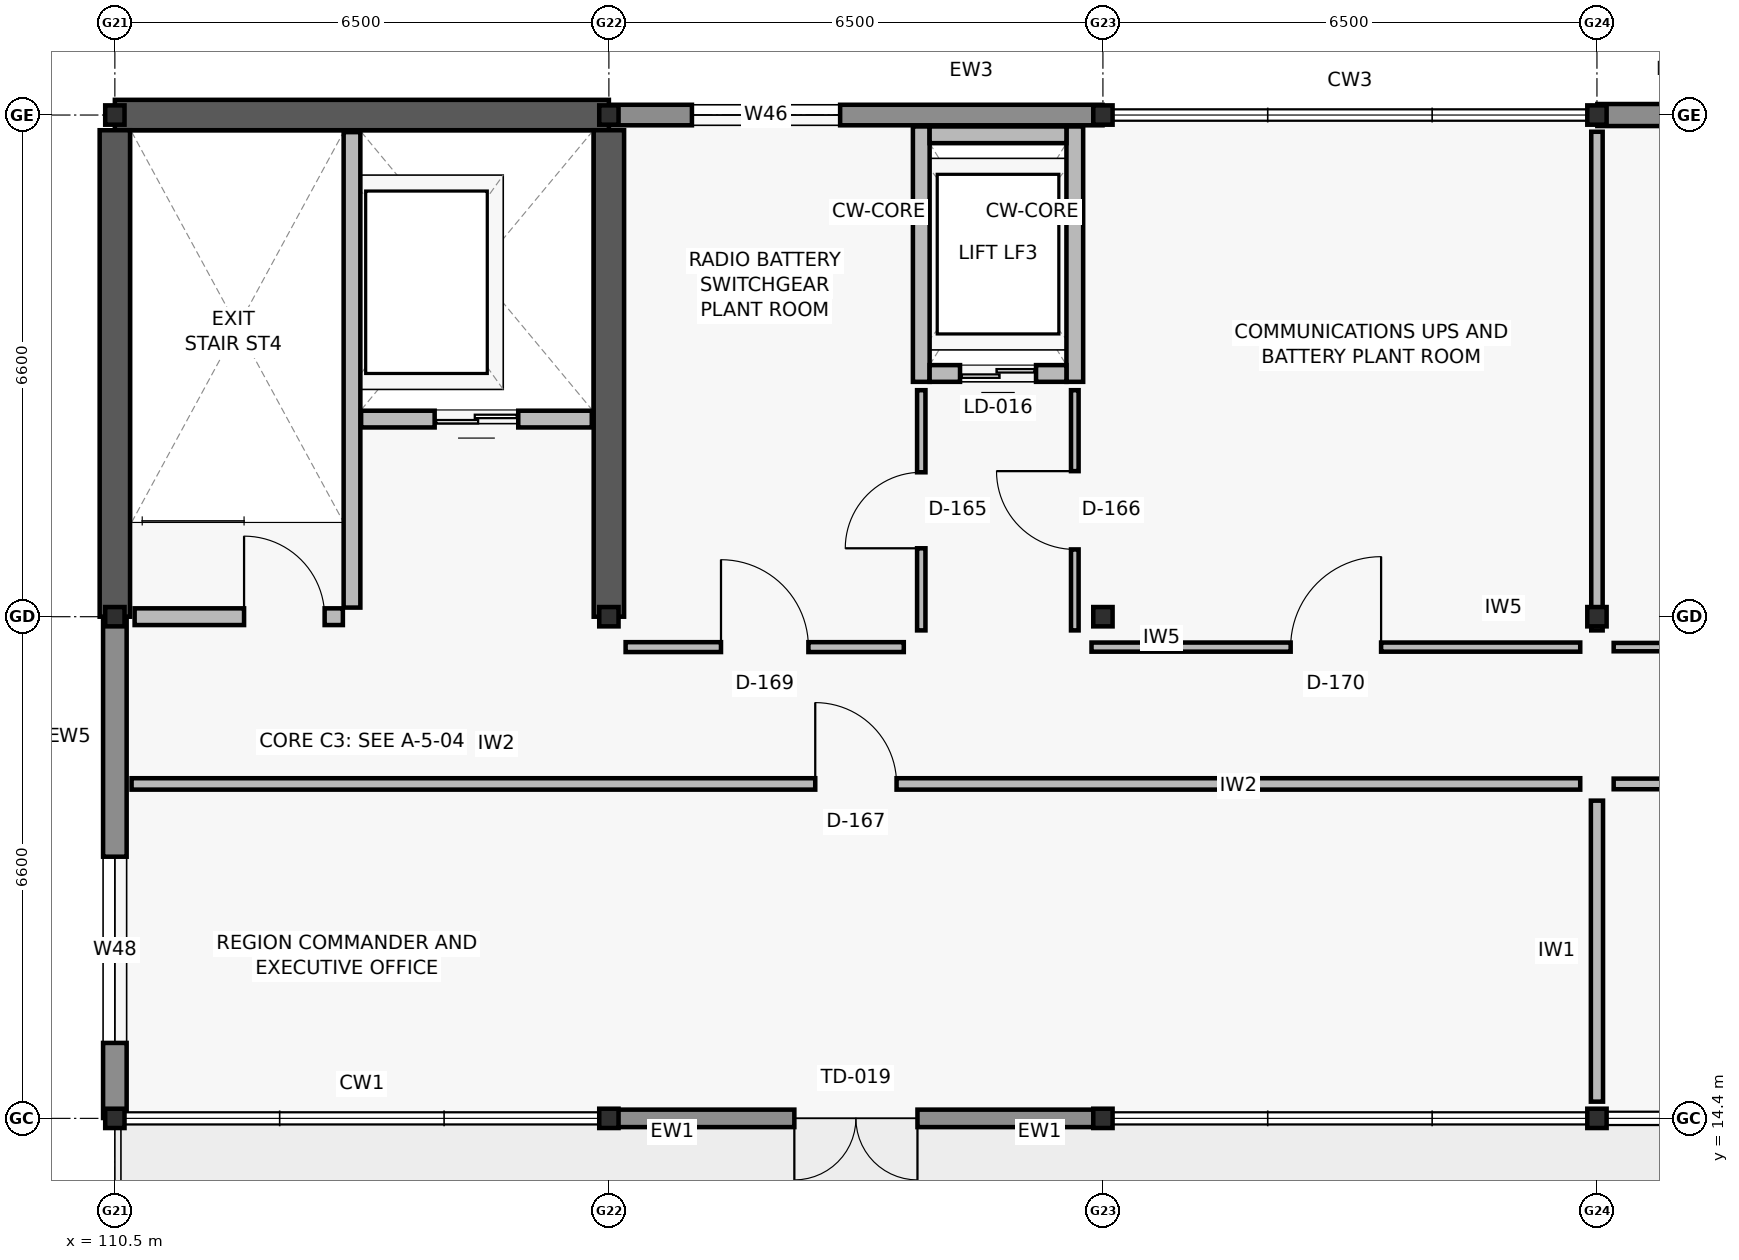
"""IFC4 building model, lengths in metres.
Left out: names, types, materials, properties, quantities, classifications, styles, units other than length and angle.
Written with IfcOpenShell. Run it as: python <this file> out.ifc"""

import sys

from ifc_helpers import new_model, si_unit, direction, frame, frame_2d, origin, origin_2d, place, context, subcontext, project, spatial, rectangle, i_section, extrude, element, fill, save


model = new_model("IFC4")
c1 = context("Model", 3, precision=1e-05, world=origin(), true_north=direction((0.0, 1.0)))
c2 = subcontext(c1, "Body", "Model", "MODEL_VIEW")
j1 = project(units=[si_unit("LENGTHUNIT", "METRE"), si_unit("PLANEANGLEUNIT", "RADIAN")], contexts=[c1])
p1 = place(None, origin())
s1 = spatial("IfcSite", under=j1, at=p1, CompositionType="ELEMENT")
p2 = place(p1, origin())
s2 = spatial("IfcBuilding", under=s1, at=p2, CompositionType="ELEMENT")
p3 = place(p2, frame((0.0, 0.0, 21.3)))
s3 = spatial("IfcBuildingStorey", under=s2, at=p3, CompositionType="ELEMENT", Elevation=21.3)
for number, where, z_axis, x_axis in (
    (1, (110.5, 14.4, 0.0), (0.0, 0.0, 1.0), (1.0, 0.0, 0.0)),
    (2, (110.5, 21.0, 0.0), (0.0, 0.0, 1.0), (1.0, 0.0, 0.0)),
    (3, (110.5, 27.6, 0.0), (0.0, 0.0, 1.0), (1.0, 0.0, 0.0)),
    (4, (117.0, 14.4, 0.0), (0.0, 0.0, 1.0), (1.0, 0.0, 0.0)),
    (5, (117.0, 21.0, 0.0), (0.0, 0.0, 1.0), (1.0, 0.0, 0.0)),
    (6, (117.0, 27.6, 0.0), (0.0, 0.0, 1.0), (1.0, 0.0, 0.0)),
    (7, (123.5, 14.4, 0.0), (0.0, 0.0, 1.0), (1.0, 0.0, 0.0)),
    (8, (123.5, 21.0, 0.0), (0.0, 0.0, 1.0), (1.0, 0.0, 0.0)),
    (9, (123.5, 27.6, 0.0), (0.0, 0.0, 1.0), (1.0, 0.0, 0.0)),
    (10, (130.0, 14.4, 0.0), (0.0, 0.0, 1.0), (1.0, 0.0, 0.0)),
    (11, (130.0, 21.0, 0.0), (0.0, 0.0, 1.0), (1.0, 0.0, 0.0)),
    (12, (130.0, 27.6, 0.0), (0.0, 0.0, 1.0), (1.0, 0.0, 0.0)),
):
    element("IfcColumn", number, at=place(p3, frame(where, z_axis=z_axis, x_axis=x_axis)), inside=s3, PredefinedType="COLUMN", context=c2, shape_type="SweptSolid", body=[
        extrude(i_section(OverallWidth=0.254, OverallDepth=0.254, WebThickness=0.009, FlangeThickness=0.014, FilletRadius=0.013, at=origin_2d()), origin(), (0.0, 0.0, 1.0), 3.9),
    ])
p4 = place(p3, frame((110.5, 27.6, 0.0), z_axis=(0.0, 0.0, 1.0), x_axis=(1.0, 0.0, 0.0)))
e13 = element("IfcWall", 13, at=p4, inside=s3, PredefinedType="SHEAR", context=c2, shape_type="SweptSolid", body=[
    extrude(rectangle(XDim=6.5, YDim=0.4, at=frame_2d((3.25, 0.0))), origin(), (0.0, 0.0, 1.0), 3.66),
])
for number, where, z_axis, x_axis in (
    (14, (110.5, 21.0, 0.0), (0.0, 0.0, 1.0), (0.0, 1.0, 0.0)),
    (15, (117.0, 21.0, 0.0), (0.0, 0.0, 1.0), (0.0, 1.0, 0.0)),
):
    element("IfcWall", number, at=place(p3, frame(where, z_axis=z_axis, x_axis=x_axis)), inside=s3, PredefinedType="SHEAR", context=c2, shape_type="SweptSolid", body=[
        extrude(rectangle(XDim=6.4, YDim=0.4, at=frame_2d((3.2, 0.0))), origin(), (0.0, 0.0, 1.0), 3.66),
    ])
p5 = place(p3, frame((123.495, 14.4, 0.0), z_axis=(0.0, 0.0, 1.0), x_axis=(-1.0, 0.0, 0.0)))
e16 = element("IfcWall", 16, at=p5, inside=s3, PredefinedType="SOLIDWALL", context=c2, shape_type="SweptSolid", body=[
    extrude(rectangle(XDim=6.49, YDim=0.23, at=frame_2d((3.245, 0.0))), origin(), (0.0, 0.0, 1.0), 3.02),
])
p6 = place(p5, frame((2.435, 0.0, 0.0)))
e17 = element("IfcOpeningElement", 17, at=p6, cuts=e16, PredefinedType="OPENING", context=c2, shape_type="SweptSolid", body=[
    extrude(rectangle(XDim=1.62, YDim=2.18, at=frame_2d((0.81, 1.09))), frame((0.0, 0.125, 0.0), z_axis=(0.0, -1.0, 0.0), x_axis=(1.0, 0.0, 0.0)), (0.0, 0.0, 1.0), 0.25),
])
p7 = place(p3, frame((117.005, 27.6, 0.0), z_axis=(0.0, 0.0, 1.0), x_axis=(1.0, 0.0, 0.0)))
e18 = element("IfcWall", 18, at=p7, inside=s3, PredefinedType="SOLIDWALL", context=c2, shape_type="SweptSolid", body=[
    extrude(rectangle(XDim=6.49, YDim=0.27, at=frame_2d((3.245, 0.0))), origin(), (0.0, 0.0, 1.0), 3.02),
])
p8 = place(p7, frame((1.087, 0.0, 0.8)))
e19 = element("IfcOpeningElement", 19, at=p8, cuts=e18, PredefinedType="OPENING", context=c2, shape_type="SweptSolid", body=[
    extrude(rectangle(XDim=1.95, YDim=1.95, at=frame_2d((0.975, 0.975))), frame((0.0, 0.145, 0.0), z_axis=(0.0, -1.0, 0.0), x_axis=(1.0, 0.0, 0.0)), (0.0, 0.0, 1.0), 0.29),
])
p9 = place(p3, frame((130.005, 27.6, 0.0), z_axis=(0.0, 0.0, 1.0), x_axis=(1.0, 0.0, 0.0)))
e20 = element("IfcWall", 20, at=p9, inside=s3, PredefinedType="SOLIDWALL", context=c2, shape_type="SweptSolid", body=[
    extrude(rectangle(XDim=6.49, YDim=0.29, at=frame_2d((3.245, 0.0))), origin(), (0.0, 0.0, 1.0), 3.02),
])
p10 = place(p9, frame((2.12, 0.0, 0.8)))
e21 = element("IfcOpeningElement", 21, at=p10, cuts=e20, PredefinedType="OPENING", context=c2, shape_type="SweptSolid", body=[
    extrude(rectangle(XDim=2.25, YDim=1.95, at=frame_2d((1.125, 0.975))), frame((0.0, 0.155, 0.0), z_axis=(0.0, -1.0, 0.0), x_axis=(1.0, 0.0, 0.0)), (0.0, 0.0, 1.0), 0.31),
])
p11 = place(p3, frame((110.5, 14.405, 0.0), z_axis=(0.0, 0.0, 1.0), x_axis=(0.0, 1.0, 0.0)))
e22 = element("IfcWall", 22, at=p11, inside=s3, PredefinedType="SOLIDWALL", context=c2, shape_type="SweptSolid", body=[
    extrude(rectangle(XDim=6.59, YDim=0.31, at=frame_2d((3.295, 0.0))), origin(), (0.0, 0.0, 1.0), 3.02),
])
p12 = place(p11, frame((0.988, 0.0, 0.8)))
e23 = element("IfcOpeningElement", 23, at=p12, cuts=e22, PredefinedType="OPENING", context=c2, shape_type="SweptSolid", body=[
    extrude(rectangle(XDim=2.45, YDim=1.95, at=frame_2d((1.225, 0.975))), frame((0.0, 0.165, 0.0), z_axis=(0.0, -1.0, 0.0), x_axis=(1.0, 0.0, 0.0)), (0.0, 0.0, 1.0), 0.33),
])
p13 = place(p3, frame((113.62, 21.12, 0.0), z_axis=(0.0, 0.0, 1.0), x_axis=(0.0, 1.0, 0.0)))
e24 = element("IfcWall", 24, at=p13, inside=s3, PredefinedType="SOLIDWALL", context=c2, shape_type="SweptSolid", body=[
    extrude(rectangle(XDim=6.255, YDim=0.22, at=frame_2d((3.127, 0.0))), origin(), (0.0, 0.0, 1.0), 3.02),
])
p14 = place(p3, frame((110.76, 21.0, 0.0), z_axis=(0.0, 0.0, 1.0), x_axis=(1.0, 0.0, 0.0)))
e25 = element("IfcWall", 25, at=p14, inside=s3, PredefinedType="SOLIDWALL", context=c2, shape_type="SweptSolid", body=[
    extrude(rectangle(XDim=2.74, YDim=0.22, at=frame_2d((1.37, 0.0))), origin(), (0.0, 0.0, 1.0), 3.02),
])
p15 = place(p14, frame((1.44, 0.0, 0.0)))
e26 = element("IfcOpeningElement", 26, at=p15, cuts=e25, PredefinedType="OPENING", context=c2, shape_type="SweptSolid", body=[
    extrude(rectangle(XDim=1.06, YDim=2.1, at=frame_2d((0.53, 1.05))), frame((0.0, 0.12, 0.0), z_axis=(0.0, -1.0, 0.0), x_axis=(1.0, 0.0, 0.0)), (0.0, 0.0, 1.0), 0.24),
])
p16 = place(p3, frame((113.74, 23.6, 0.0), z_axis=(0.0, 0.0, 1.0), x_axis=(1.0, 0.0, 0.0)))
e27 = element("IfcWall", 27, at=p16, inside=s3, PredefinedType="SOLIDWALL", context=c2, shape_type="SweptSolid", body=[
    extrude(rectangle(XDim=3.035, YDim=0.22, at=frame_2d((1.518, 0.0))), origin(), (0.0, 0.0, 1.0), 3.02),
])
p17 = place(p16, frame((0.968, 0.0, 0.0)))
e28 = element("IfcOpeningElement", 28, at=p17, cuts=e27, PredefinedType="OPENING", context=c2, shape_type="SweptSolid", body=[
    extrude(rectangle(XDim=1.1, YDim=2.1, at=frame_2d((0.55, 1.05))), frame((0.0, 0.12, 0.0), z_axis=(0.0, -1.0, 0.0), x_axis=(1.0, 0.0, 0.0)), (0.0, 0.0, 1.0), 0.24),
])
for number, where, z_axis, x_axis in (
    (29, (121.11, 24.09, 0.0), (0.0, 0.0, 1.0), (0.0, 1.0, 0.0)),
    (30, (123.13, 24.09, 0.0), (0.0, 0.0, 1.0), (0.0, 1.0, 0.0)),
):
    element("IfcWall", number, at=place(p3, frame(where, z_axis=z_axis, x_axis=x_axis)), inside=s3, PredefinedType="SOLIDWALL", context=c2, shape_type="SweptSolid", body=[
        extrude(rectangle(XDim=3.36, YDim=0.22, at=frame_2d((1.68, 0.0))), origin(), (0.0, 0.0, 1.0), 3.02),
    ])
p18 = place(p3, frame((121.22, 27.34, 0.0), z_axis=(0.0, 0.0, 1.0), x_axis=(1.0, 0.0, 0.0)))
e31 = element("IfcWall", 31, at=p18, inside=s3, PredefinedType="SOLIDWALL", context=c2, shape_type="SweptSolid", body=[
    extrude(rectangle(XDim=1.8, YDim=0.22, at=frame_2d((0.9, 0.0))), origin(), (0.0, 0.0, 1.0), 3.02),
])
p19 = place(p3, frame((121.22, 24.2, 0.0), z_axis=(0.0, 0.0, 1.0), x_axis=(1.0, 0.0, 0.0)))
e32 = element("IfcWall", 32, at=p19, inside=s3, PredefinedType="SOLIDWALL", context=c2, shape_type="SweptSolid", body=[
    extrude(rectangle(XDim=1.8, YDim=0.22, at=frame_2d((0.9, 0.0))), origin(), (0.0, 0.0, 1.0), 3.02),
])
p20 = place(p19, frame((0.4, 0.0, 0.0)))
e33 = element("IfcOpeningElement", 33, at=p20, cuts=e32, PredefinedType="OPENING", context=c2, shape_type="SweptSolid", body=[
    extrude(rectangle(XDim=1.0, YDim=2.1, at=frame_2d((0.5, 1.05))), frame((0.0, 0.12, 0.0), z_axis=(0.0, -1.0, 0.0), x_axis=(1.0, 0.0, 0.0)), (0.0, 0.0, 1.0), 0.24),
])
p21 = place(p3, frame((121.11, 20.82, 0.0), z_axis=(0.0, 0.0, 1.0), x_axis=(0.0, 1.0, 0.0)))
e34 = element("IfcWall", 34, at=p21, inside=s3, PredefinedType="PARTITIONING", context=c2, shape_type="SweptSolid", body=[
    extrude(rectangle(XDim=3.16, YDim=0.11, at=frame_2d((1.58, 0.0))), origin(), (0.0, 0.0, 1.0), 3.0),
])
p22 = place(p21, frame((1.08, 0.0, 0.0)))
e35 = element("IfcOpeningElement", 35, at=p22, cuts=e34, PredefinedType="OPENING", context=c2, shape_type="SweptSolid", body=[
    extrude(rectangle(XDim=1.0, YDim=2.12, at=frame_2d((0.5, 1.06))), frame((0.0, 0.065, 0.0), z_axis=(0.0, -1.0, 0.0), x_axis=(1.0, 0.0, 0.0)), (0.0, 0.0, 1.0), 0.13),
])
p23 = place(p3, frame((123.13, 20.82, 0.0), z_axis=(0.0, 0.0, 1.0), x_axis=(0.0, 1.0, 0.0)))
e36 = element("IfcWall", 36, at=p23, inside=s3, PredefinedType="PARTITIONING", context=c2, shape_type="SweptSolid", body=[
    extrude(rectangle(XDim=3.16, YDim=0.1, at=frame_2d((1.58, 0.0))), origin(), (0.0, 0.0, 1.0), 3.0),
])
p24 = place(p23, frame((1.065, 0.0, 0.0)))
e37 = element("IfcOpeningElement", 37, at=p24, cuts=e36, PredefinedType="OPENING", context=c2, shape_type="SweptSolid", body=[
    extrude(rectangle(XDim=1.03, YDim=2.06, at=frame_2d((0.515, 1.03))), frame((0.0, 0.06, 0.0), z_axis=(0.0, -1.0, 0.0), x_axis=(1.0, 0.0, 0.0)), (0.0, 0.0, 1.0), 0.12),
])
p25 = place(p3, frame((130.0, 14.62, 0.0), z_axis=(0.0, 0.0, 1.0), x_axis=(0.0, 1.0, 0.0)))
e38 = element("IfcWall", 38, at=p25, inside=s3, PredefinedType="PARTITIONING", context=c2, shape_type="SweptSolid", body=[
    extrude(rectangle(XDim=3.96, YDim=0.16, at=frame_2d((1.98, 0.0))), origin(), (0.0, 0.0, 1.0), 3.0),
])
p26 = place(p3, frame((110.72, 18.8, 0.0), z_axis=(0.0, 0.0, 1.0), x_axis=(1.0, 0.0, 0.0)))
e39 = element("IfcWall", 39, at=p26, inside=s3, PredefinedType="PARTITIONING", context=c2, shape_type="SweptSolid", body=[
    extrude(rectangle(XDim=19.06, YDim=0.15, at=frame_2d((9.53, 0.0))), origin(), (0.0, 0.0, 1.0), 3.0),
])
p27 = place(p26, frame((8.995, 0.0, 0.0)))
e40 = element("IfcOpeningElement", 40, at=p27, cuts=e39, PredefinedType="OPENING", context=c2, shape_type="SweptSolid", body=[
    extrude(rectangle(XDim=1.07, YDim=2.08, at=frame_2d((0.535, 1.04))), frame((0.0, 0.085, 0.0), z_axis=(0.0, -1.0, 0.0), x_axis=(1.0, 0.0, 0.0)), (0.0, 0.0, 1.0), 0.17),
])
p28 = place(p3, frame((130.22, 18.8, 0.0), z_axis=(0.0, 0.0, 1.0), x_axis=(1.0, 0.0, 0.0)))
e41 = element("IfcWall", 41, at=p28, inside=s3, PredefinedType="PARTITIONING", context=c2, shape_type="SweptSolid", body=[
    extrude(rectangle(XDim=25.56, YDim=0.14, at=frame_2d((12.78, 0.0))), origin(), (0.0, 0.0, 1.0), 3.0),
])
p29 = place(p28, frame((12.225, 0.0, 0.0)))
e42 = element("IfcOpeningElement", 42, at=p29, cuts=e41, PredefinedType="OPENING", context=c2, shape_type="SweptSolid", body=[
    extrude(rectangle(XDim=1.11, YDim=2.1, at=frame_2d((0.555, 1.05))), frame((0.0, 0.08, 0.0), z_axis=(0.0, -1.0, 0.0), x_axis=(1.0, 0.0, 0.0)), (0.0, 0.0, 1.0), 0.16),
])
p30 = place(p3, frame((117.22, 20.6, 0.0), z_axis=(0.0, 0.0, 1.0), x_axis=(1.0, 0.0, 0.0)))
e43 = element("IfcWall", 43, at=p30, inside=s3, PredefinedType="PARTITIONING", context=c2, shape_type="SweptSolid", body=[
    extrude(rectangle(XDim=3.66, YDim=0.13, at=frame_2d((1.83, 0.0))), origin(), (0.0, 0.0, 1.0), 3.0),
])
p31 = place(p30, frame((1.255, 0.0, 0.0)))
e44 = element("IfcOpeningElement", 44, at=p31, cuts=e43, PredefinedType="OPENING", context=c2, shape_type="SweptSolid", body=[
    extrude(rectangle(XDim=1.15, YDim=2.12, at=frame_2d((0.575, 1.06))), frame((0.0, 0.075, 0.0), z_axis=(0.0, -1.0, 0.0), x_axis=(1.0, 0.0, 0.0)), (0.0, 0.0, 1.0), 0.15),
])
p32 = place(p3, frame((123.35, 20.6, 0.0), z_axis=(0.0, 0.0, 1.0), x_axis=(1.0, 0.0, 0.0)))
e45 = element("IfcWall", 45, at=p32, inside=s3, PredefinedType="PARTITIONING", context=c2, shape_type="SweptSolid", body=[
    extrude(rectangle(XDim=6.43, YDim=0.12, at=frame_2d((3.215, 0.0))), origin(), (0.0, 0.0, 1.0), 3.0),
])
p33 = place(p32, frame((2.62, 0.0, 0.0)))
e46 = element("IfcOpeningElement", 46, at=p33, cuts=e45, PredefinedType="OPENING", context=c2, shape_type="SweptSolid", body=[
    extrude(rectangle(XDim=1.19, YDim=2.14, at=frame_2d((0.595, 1.07))), frame((0.0, 0.07, 0.0), z_axis=(0.0, -1.0, 0.0), x_axis=(1.0, 0.0, 0.0)), (0.0, 0.0, 1.0), 0.14),
])
p34 = place(p3, frame((130.22, 20.6, 0.0), z_axis=(0.0, 0.0, 1.0), x_axis=(1.0, 0.0, 0.0)))
e47 = element("IfcWall", 47, at=p34, inside=s3, PredefinedType="PARTITIONING", context=c2, shape_type="SweptSolid", body=[
    extrude(rectangle(XDim=6.06, YDim=0.11, at=frame_2d((3.03, 0.0))), origin(), (0.0, 0.0, 1.0), 3.0),
])
p35 = place(p34, frame((2.415, 0.0, 0.0)))
e48 = element("IfcOpeningElement", 48, at=p35, cuts=e47, PredefinedType="OPENING", context=c2, shape_type="SweptSolid", body=[
    extrude(rectangle(XDim=1.23, YDim=2.08, at=frame_2d((0.615, 1.04))), frame((0.0, 0.065, 0.0), z_axis=(0.0, -1.0, 0.0), x_axis=(1.0, 0.0, 0.0)), (0.0, 0.0, 1.0), 0.13),
])
p36 = place(p3, frame((130.0, 20.82, 0.0), z_axis=(0.0, 0.0, 1.0), x_axis=(0.0, 1.0, 0.0)))
e49 = element("IfcWall", 49, at=p36, inside=s3, PredefinedType="PARTITIONING", context=c2, shape_type="SweptSolid", body=[
    extrude(rectangle(XDim=6.56, YDim=0.15, at=frame_2d((3.28, 0.0))), origin(), (0.0, 0.0, 1.0), 3.0),
])
p37 = place(p6, origin())
e50 = element("IfcDoor", 50, at=p37, inside=s3, OperationType="DOUBLE_DOOR_SINGLE_SWING", PredefinedType="DOOR", context=c2, shape_type="SweptSolid", body=[
    extrude(rectangle(XDim=1.62, YDim=2.18, at=frame_2d((0.81, 1.09))), frame((0.0, 0.025, 0.0), z_axis=(0.0, -1.0, 0.0), x_axis=(1.0, 0.0, 0.0)), (0.0, 0.0, 1.0), 0.05),
])
fill(e17, e50)
p38 = place(p8, origin())
e51 = element("IfcWindow", 51, at=p38, inside=s3, PartitioningType="DOUBLE_PANEL_VERTICAL", PredefinedType="WINDOW", context=c2, shape_type="SweptSolid", body=[
    extrude(rectangle(XDim=1.95, YDim=1.95, at=frame_2d((0.975, 0.975))), frame((0.0, 0.03, 0.0), z_axis=(0.0, -1.0, 0.0), x_axis=(1.0, 0.0, 0.0)), (0.0, 0.0, 1.0), 0.06),
])
fill(e19, e51)
p39 = place(p12, origin())
e52 = element("IfcWindow", 52, at=p39, inside=s3, PartitioningType="TRIPLE_PANEL_VERTICAL", PredefinedType="WINDOW", context=c2, shape_type="SweptSolid", body=[
    extrude(rectangle(XDim=2.45, YDim=1.95, at=frame_2d((1.225, 0.975))), frame((0.0, 0.03, 0.0), z_axis=(0.0, -1.0, 0.0), x_axis=(1.0, 0.0, 0.0)), (0.0, 0.0, 1.0), 0.06),
])
fill(e23, e52)
p40 = place(p15, origin())
e53 = element("IfcDoor", 53, at=p40, inside=s3, OperationType="SINGLE_SWING_LEFT", PredefinedType="DOOR", context=c2, shape_type="SweptSolid", body=[
    extrude(rectangle(XDim=1.06, YDim=2.1, at=frame_2d((0.53, 1.05))), frame((0.0, 0.025, 0.0), z_axis=(0.0, -1.0, 0.0), x_axis=(1.0, 0.0, 0.0)), (0.0, 0.0, 1.0), 0.05),
])
fill(e26, e53)
p41 = place(p17, origin())
e54 = element("IfcDoor", 54, at=p41, inside=s3, OperationType="DOUBLE_DOOR_SLIDING", PredefinedType="DOOR", context=c2, shape_type="SweptSolid", body=[
    extrude(rectangle(XDim=1.1, YDim=2.1, at=frame_2d((0.55, 1.05))), frame((0.0, 0.025, 0.0), z_axis=(0.0, -1.0, 0.0), x_axis=(1.0, 0.0, 0.0)), (0.0, 0.0, 1.0), 0.05),
])
fill(e28, e54)
p42 = place(p20, origin())
e55 = element("IfcDoor", 55, at=p42, inside=s3, OperationType="DOUBLE_DOOR_SLIDING", PredefinedType="DOOR", context=c2, shape_type="SweptSolid", body=[
    extrude(rectangle(XDim=1.0, YDim=2.1, at=frame_2d((0.5, 1.05))), frame((0.0, 0.025, 0.0), z_axis=(0.0, -1.0, 0.0), x_axis=(1.0, 0.0, 0.0)), (0.0, 0.0, 1.0), 0.05),
])
fill(e33, e55)
p43 = place(p22, origin())
e56 = element("IfcDoor", 56, at=p43, inside=s3, OperationType="SINGLE_SWING_LEFT", PredefinedType="DOOR", context=c2, shape_type="SweptSolid", body=[
    extrude(rectangle(XDim=1.0, YDim=2.12, at=frame_2d((0.5, 1.06))), frame((0.0, 0.025, 0.0), z_axis=(0.0, -1.0, 0.0), x_axis=(1.0, 0.0, 0.0)), (0.0, 0.0, 1.0), 0.05),
])
fill(e35, e56)
p44 = place(p24, origin())
e57 = element("IfcDoor", 57, at=p44, inside=s3, OperationType="SINGLE_SWING_RIGHT", PredefinedType="DOOR", context=c2, shape_type="SweptSolid", body=[
    extrude(rectangle(XDim=1.03, YDim=2.06, at=frame_2d((0.515, 1.03))), frame((0.0, 0.025, 0.0), z_axis=(0.0, -1.0, 0.0), x_axis=(1.0, 0.0, 0.0)), (0.0, 0.0, 1.0), 0.05),
])
fill(e37, e57)
p45 = place(p27, origin())
e58 = element("IfcDoor", 58, at=p45, inside=s3, OperationType="SINGLE_SWING_LEFT", PredefinedType="DOOR", context=c2, shape_type="SweptSolid", body=[
    extrude(rectangle(XDim=1.07, YDim=2.08, at=frame_2d((0.535, 1.04))), frame((0.0, 0.025, 0.0), z_axis=(0.0, -1.0, 0.0), x_axis=(1.0, 0.0, 0.0)), (0.0, 0.0, 1.0), 0.05),
])
fill(e40, e58)
p46 = place(p31, origin())
e59 = element("IfcDoor", 59, at=p46, inside=s3, OperationType="SINGLE_SWING_LEFT", PredefinedType="DOOR", context=c2, shape_type="SweptSolid", body=[
    extrude(rectangle(XDim=1.15, YDim=2.12, at=frame_2d((0.575, 1.06))), frame((0.0, 0.025, 0.0), z_axis=(0.0, -1.0, 0.0), x_axis=(1.0, 0.0, 0.0)), (0.0, 0.0, 1.0), 0.05),
])
fill(e44, e59)
p47 = place(p33, origin())
e60 = element("IfcDoor", 60, at=p47, inside=s3, OperationType="SINGLE_SWING_RIGHT", PredefinedType="DOOR", context=c2, shape_type="SweptSolid", body=[
    extrude(rectangle(XDim=1.19, YDim=2.14, at=frame_2d((0.595, 1.07))), frame((0.0, 0.025, 0.0), z_axis=(0.0, -1.0, 0.0), x_axis=(1.0, 0.0, 0.0)), (0.0, 0.0, 1.0), 0.05),
])
fill(e46, e60)
save(model, sys.argv[1])
